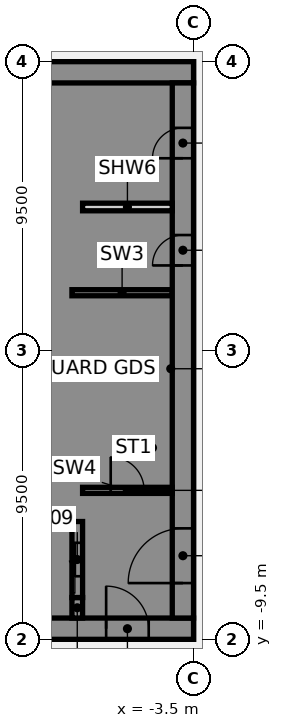
"""IFC4 building model, lengths in metres.
Left out: names, types, materials, properties, quantities, classifications, styles, units other than length and angle.
Written with IfcOpenShell. Run it as: python <this file> out.ifc"""

import sys

from ifc_helpers import new_model, si_unit, direction, frame, frame_2d, origin, place, context, subcontext, project, spatial, polyline, rectangle, outline, extrude, element, fill, save


model = new_model("IFC4")
c1 = context("Model", 3, precision=1e-05, world=origin(), true_north=direction((0.0, 1.0)))
c2 = subcontext(c1, "Body", "Model", "MODEL_VIEW")
j1 = project(units=[si_unit("LENGTHUNIT", "METRE"), si_unit("PLANEANGLEUNIT", "RADIAN")], contexts=[c1])
p1 = place(None, origin())
s1 = spatial("IfcSite", under=j1, at=p1, CompositionType="ELEMENT")
p2 = place(p1, origin())
s2 = spatial("IfcBuilding", under=s1, at=p2, CompositionType="ELEMENT")
p3 = place(p2, frame((0.0, 0.0, 45.25)))
s3 = spatial("IfcBuildingStorey", under=s2, at=p3, CompositionType="ELEMENT", Elevation=45.25)
p4 = place(p3, frame((-16.5, -9.15, 0.0), z_axis=(0.0, 0.0, 1.0), x_axis=(1.0, 0.0, 0.0)))
e1 = element("IfcWall", 1, at=p4, inside=s3, PredefinedType="SHEAR", context=c2, shape_type="SweptSolid", body=[
    extrude(rectangle(XDim=13.0, YDim=0.7, at=frame_2d((6.5, 0.0))), origin(), (0.0, 0.0, 1.0), 3.61),
])
p5 = place(p4, frame((4.15, 0.0, 0.0)))
e2 = element("IfcOpeningElement", 2, at=p5, cuts=e1, PredefinedType="OPENING", context=c2, shape_type="SweptSolid", body=[
    extrude(rectangle(XDim=1.4, YDim=2.1, at=frame_2d((0.7, 1.05))), frame((0.0, 0.36, 0.0), z_axis=(0.0, -1.0, 0.0), x_axis=(1.0, 0.0, 0.0)), (0.0, 0.0, 1.0), 0.72),
])
p6 = place(p4, frame((10.125, 0.0, 0.0)))
e3 = element("IfcOpeningElement", 3, at=p6, cuts=e1, PredefinedType="OPENING", context=c2, shape_type="SweptSolid", body=[
    extrude(rectangle(XDim=1.4, YDim=2.1, at=frame_2d((0.7, 1.05))), frame((0.0, 0.36, 0.0), z_axis=(0.0, -1.0, 0.0), x_axis=(1.0, 0.0, 0.0)), (0.0, 0.0, 1.0), 0.72),
])
p7 = place(p3, frame((-16.5, 9.15, 0.0), z_axis=(0.0, 0.0, 1.0), x_axis=(1.0, 0.0, 0.0)))
e4 = element("IfcWall", 4, at=p7, inside=s3, PredefinedType="SHEAR", context=c2, shape_type="SweptSolid", body=[
    extrude(rectangle(XDim=13.0, YDim=0.7, at=frame_2d((6.5, 0.0))), origin(), (0.0, 0.0, 1.0), 3.61),
])
p8 = place(p3, origin())
e5 = element("IfcWall", 5, at=p8, inside=s3, PredefinedType="SHEAR", context=c2, shape_type="SweptSolid", body=[
    extrude(outline(polyline([(-9.8, -5.375), (-9.8, -5.625), (-7.5, -5.625), (-7.15, -5.625), (-7.15, 8.8), (-7.5, 8.8), (-9.8, 8.8), (-9.8, 8.125), (-7.5, 8.125), (-7.5, 5.625), (-9.8, 5.625), (-9.8, 5.375), (-7.5, 5.375), (-7.5, 2.875), (-9.8, 2.875), (-9.8, 2.625), (-7.5, 2.625), (-7.5, 0.125), (-9.8, 0.125), (-9.8, -0.125), (-7.5, -0.125), (-7.5, -2.625), (-9.8, -2.625), (-9.8, -2.875), (-7.5, -2.875), (-7.5, -5.375), (-9.8, -5.375)])), origin(), (0.0, 0.0, 1.0), 3.61),
])
p9 = place(p3, origin())
e6 = element("IfcWall", 6, at=p9, inside=s3, PredefinedType="SHEAR", context=c2, shape_type="SweptSolid", body=[
    extrude(outline(polyline([(-7.5, -8.125), (-9.55, -8.125), (-9.55, -5.625), (-9.8, -5.625), (-9.8, -8.125), (-9.8, -8.8), (-7.5, -8.8), (-7.5, -8.125)])), origin(), (0.0, 0.0, 1.0), 3.61),
])
p10 = place(p3, frame((-7.325, -8.8, 0.0), z_axis=(0.0, 0.0, 1.0), x_axis=(0.0, 1.0, 0.0)))
e7 = element("IfcWall", 7, at=p10, inside=s3, PredefinedType="SHEAR", context=c2, shape_type="SweptSolid", body=[
    extrude(rectangle(XDim=0.675, YDim=0.35, at=frame_2d((0.337, 0.0))), origin(), (0.0, 0.0, 1.0), 3.61),
])
p11 = place(p3, frame((-7.5, 1.9, 0.0), z_axis=(0.0, 0.0, 1.0), x_axis=(1.0, 0.0, 0.0)))
e8 = element("IfcWall", 8, at=p11, inside=s3, PredefinedType="SHEAR", context=c2, shape_type="SweptSolid", body=[
    extrude(rectangle(XDim=3.3, YDim=0.2, at=frame_2d((1.65, 0.0))), origin(), (0.0, 0.0, 1.0), 3.61),
])
p12 = place(p3, frame((-7.325, -8.125, 0.0), z_axis=(0.0, 0.0, 1.0), x_axis=(0.0, 1.0, 0.0)))
e9 = element("IfcWall", 9, at=p12, inside=s3, PredefinedType="SHEAR", context=c2, shape_type="SweptSolid", body=[
    extrude(rectangle(XDim=2.5, YDim=0.35, at=frame_2d((1.25, 0.0))), origin(), (0.0, 0.0, 1.0), 3.61),
])
p13 = place(p12, frame((0.7, 0.0, 0.0)))
e10 = element("IfcOpeningElement", 10, at=p13, cuts=e9, PredefinedType="OPENING", context=c2, shape_type="SweptSolid", body=[
    extrude(rectangle(XDim=1.1, YDim=2.1, at=frame_2d((0.55, 1.05))), frame((0.0, 0.185, 0.0), z_axis=(0.0, -1.0, 0.0), x_axis=(1.0, 0.0, 0.0)), (0.0, 0.0, 1.0), 0.37),
])
p14 = place(p3, frame((-3.85, -8.8, 0.0), z_axis=(0.0, 0.0, 1.0), x_axis=(0.0, 1.0, 0.0)))
e11 = element("IfcWall", 11, at=p14, inside=s3, PredefinedType="SHEAR", context=c2, shape_type="SweptSolid", body=[
    extrude(rectangle(XDim=17.6, YDim=0.7, at=frame_2d((8.8, 0.0))), origin(), (0.0, 0.0, 1.0), 3.61),
])
p15 = place(p14, frame((1.15, 0.0, 0.0)))
e12 = element("IfcOpeningElement", 12, at=p15, cuts=e11, PredefinedType="OPENING", context=c2, shape_type="SweptSolid", body=[
    extrude(rectangle(XDim=1.8, YDim=2.1, at=frame_2d((0.9, 1.05))), frame((0.0, 0.36, 0.0), z_axis=(0.0, -1.0, 0.0), x_axis=(1.0, 0.0, 0.0)), (0.0, 0.0, 1.0), 0.72),
])
p16 = place(p14, frame((11.597, 0.0, 0.0)))
e13 = element("IfcOpeningElement", 13, at=p16, cuts=e11, PredefinedType="OPENING", context=c2, shape_type="SweptSolid", body=[
    extrude(rectangle(XDim=1.0, YDim=2.1, at=frame_2d((0.5, 1.05))), frame((0.0, 0.36, 0.0), z_axis=(0.0, -1.0, 0.0), x_axis=(1.0, 0.0, 0.0)), (0.0, 0.0, 1.0), 0.72),
])
p17 = place(p14, frame((15.123, 0.0, 0.0)))
e14 = element("IfcOpeningElement", 14, at=p17, cuts=e11, PredefinedType="OPENING", context=c2, shape_type="SweptSolid", body=[
    extrude(rectangle(XDim=1.0, YDim=2.1, at=frame_2d((0.5, 1.05))), frame((0.0, 0.36, 0.0), z_axis=(0.0, -1.0, 0.0), x_axis=(1.0, 0.0, 0.0)), (0.0, 0.0, 1.0), 0.72),
])
p18 = place(p3, frame((-7.15, 4.72, 0.0), z_axis=(0.0, 0.0, 1.0), x_axis=(1.0, 0.0, 0.0)))
e15 = element("IfcWall", 15, at=p18, inside=s3, PredefinedType="PARTITIONING", context=c2, shape_type="SweptSolid", body=[
    extrude(rectangle(XDim=2.95, YDim=0.25, at=frame_2d((1.475, 0.0))), origin(), (0.0, 0.0, 1.0), 3.61),
])
p19 = place(p3, frame((-7.15, -4.6, 0.0), z_axis=(0.0, 0.0, 1.0), x_axis=(1.0, 0.0, 0.0)))
e16 = element("IfcWall", 16, at=p19, inside=s3, PredefinedType="SHEAR", context=c2, shape_type="SweptSolid", body=[
    extrude(rectangle(XDim=2.95, YDim=0.2, at=frame_2d((1.475, 0.0))), origin(), (0.0, 0.0, 1.0), 3.61),
])
p20 = place(p19, frame((0.925, 0.0, 0.0)))
e17 = element("IfcOpeningElement", 17, at=p20, cuts=e16, PredefinedType="OPENING", context=c2, shape_type="SweptSolid", body=[
    extrude(rectangle(XDim=1.1, YDim=2.1, at=frame_2d((0.55, 1.05))), frame((0.0, 0.11, 0.0), z_axis=(0.0, -1.0, 0.0), x_axis=(1.0, 0.0, 0.0)), (0.0, 0.0, 1.0), 0.22),
])
p21 = place(p6, origin())
e18 = element("IfcDoor", 18, at=p21, inside=s3, OperationType="SINGLE_SWING_LEFT", PredefinedType="DOOR", context=c2, shape_type="SweptSolid", body=[
    extrude(rectangle(XDim=1.4, YDim=2.1, at=frame_2d((0.7, 1.05))), frame((0.0, 0.025, 0.0), z_axis=(0.0, -1.0, 0.0), x_axis=(1.0, 0.0, 0.0)), (0.0, 0.0, 1.0), 0.05),
])
fill(e3, e18)
p22 = place(p15, origin())
e19 = element("IfcDoor", 19, at=p22, inside=s3, OperationType="SINGLE_SWING_LEFT", PredefinedType="DOOR", context=c2, shape_type="SweptSolid", body=[
    extrude(rectangle(XDim=1.8, YDim=2.1, at=frame_2d((0.9, 1.05))), frame((0.0, 0.025, 0.0), z_axis=(0.0, -1.0, 0.0), x_axis=(1.0, 0.0, 0.0)), (0.0, 0.0, 1.0), 0.05),
])
fill(e12, e19)
p23 = place(p16, origin())
e20 = element("IfcDoor", 20, at=p23, inside=s3, OperationType="SINGLE_SWING_LEFT", PredefinedType="DOOR", context=c2, shape_type="SweptSolid", body=[
    extrude(rectangle(XDim=1.0, YDim=2.1, at=frame_2d((0.5, 1.05))), frame((0.0, 0.325, 0.0), z_axis=(0.0, -1.0, 0.0), x_axis=(1.0, 0.0, 0.0)), (0.0, 0.0, 1.0), 0.05),
])
fill(e13, e20)
p24 = place(p17, origin())
e21 = element("IfcDoor", 21, at=p24, inside=s3, OperationType="SINGLE_SWING_LEFT", PredefinedType="DOOR", context=c2, shape_type="SweptSolid", body=[
    extrude(rectangle(XDim=1.0, YDim=2.1, at=frame_2d((0.5, 1.05))), frame((0.0, 0.325, 0.0), z_axis=(0.0, -1.0, 0.0), x_axis=(1.0, 0.0, 0.0)), (0.0, 0.0, 1.0), 0.05),
])
fill(e14, e21)
p25 = place(p20, origin())
e22 = element("IfcDoor", 22, at=p25, inside=s3, OperationType="SINGLE_SWING_LEFT", PredefinedType="DOOR", context=c2, shape_type="SweptSolid", body=[
    extrude(rectangle(XDim=1.1, YDim=2.1, at=frame_2d((0.55, 1.05))), frame((0.0, 0.025, 0.0), z_axis=(0.0, -1.0, 0.0), x_axis=(1.0, 0.0, 0.0)), (0.0, 0.0, 1.0), 0.05),
])
fill(e17, e22)
p26 = place(p13, origin())
e23 = element("IfcDoor", 23, at=p26, inside=s3, OperationType="SLIDING_TO_LEFT", PredefinedType="DOOR", context=c2, shape_type="SweptSolid", body=[
    extrude(rectangle(XDim=1.1, YDim=2.1, at=frame_2d((0.55, 1.05))), frame((0.0, 0.025, 0.0), z_axis=(0.0, -1.0, 0.0), x_axis=(1.0, 0.0, 0.0)), (0.0, 0.0, 1.0), 0.05),
])
fill(e10, e23)
save(model, sys.argv[1])
